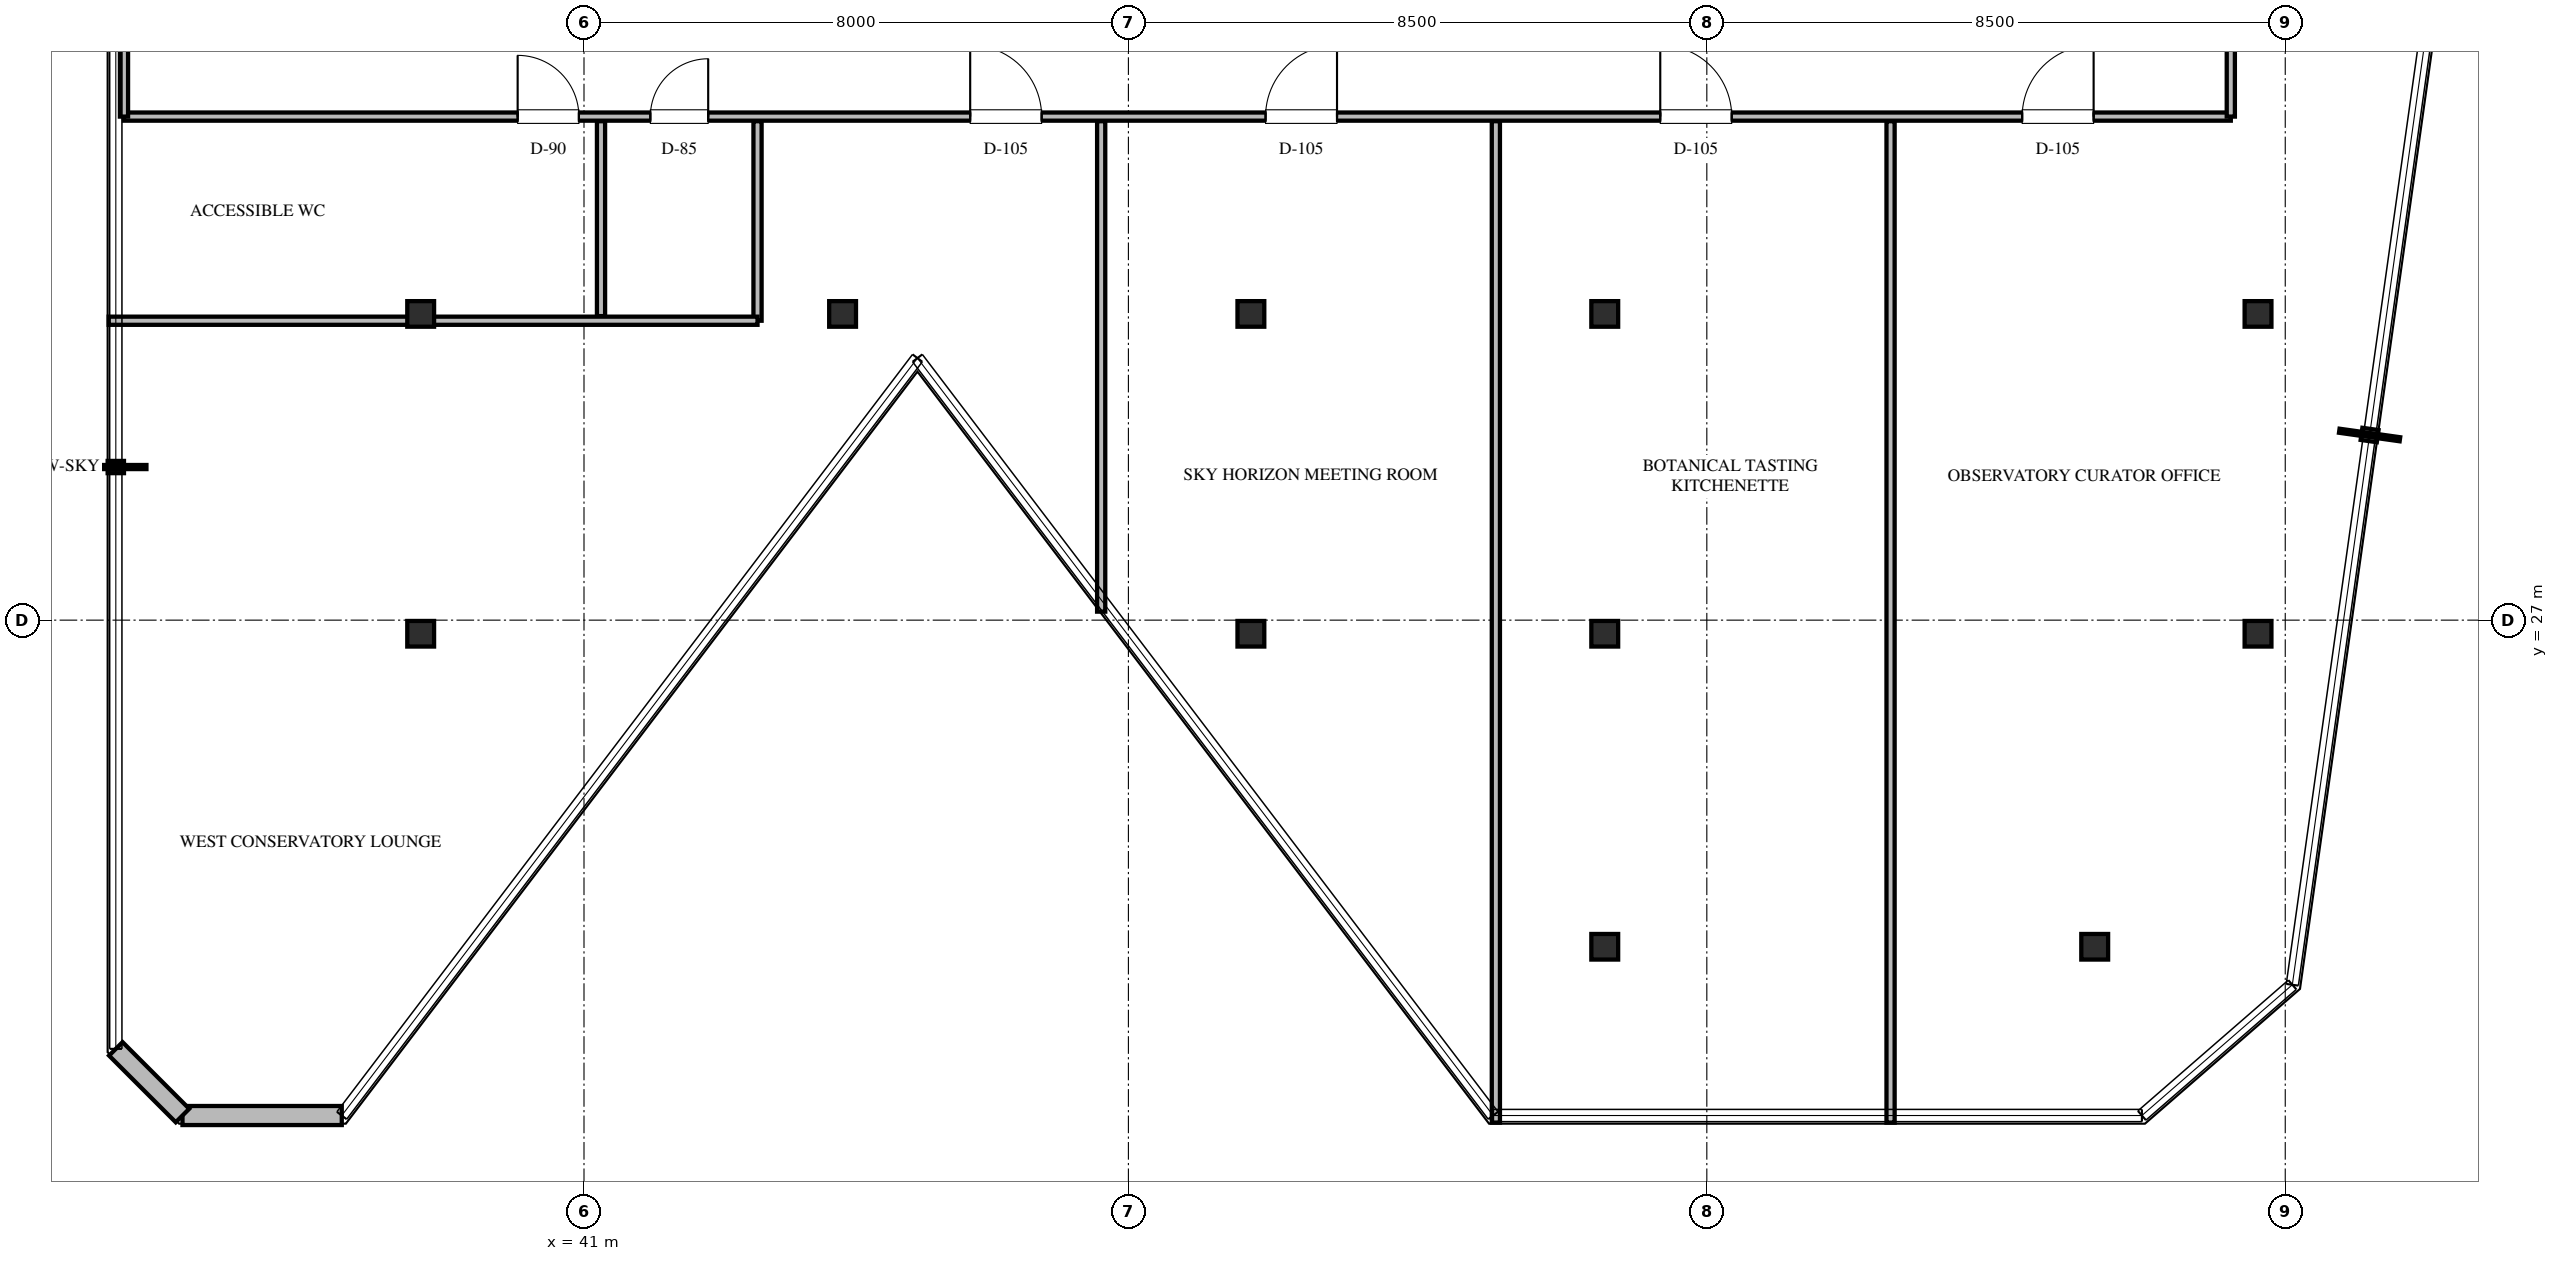
"""IFC4 building model, lengths in metres.
Left out: names, types, materials, properties, quantities, classifications, styles, units other than length and angle.
Written with IfcOpenShell. Run it as: python <this file> out.ifc"""

import sys

from ifc_helpers import new_model, si_unit, direction, frame, frame_2d, origin, origin_2d, place, context, subcontext, project, spatial, rectangle, i_section, extrude, element, fill, save


model = new_model("IFC4")
c1 = context("Model", 3, precision=1e-05, world=origin(), true_north=direction((0.0, 1.0)))
c2 = subcontext(c1, "Body", "Model", "MODEL_VIEW")
j1 = project(units=[si_unit("LENGTHUNIT", "METRE"), si_unit("PLANEANGLEUNIT", "RADIAN")], contexts=[c1])
p1 = place(None, origin())
s1 = spatial("IfcSite", under=j1, at=p1, CompositionType="ELEMENT")
p2 = place(p1, origin())
s2 = spatial("IfcBuilding", under=s1, at=p2, CompositionType="ELEMENT")
p3 = place(p2, frame((0.0, 0.0, 311.1)))
s3 = spatial("IfcBuildingStorey", under=s2, at=p3, CompositionType="ELEMENT", Elevation=311.1)
for number, where, z_axis, x_axis in (
    (1, (44.8, 31.5, 0.0), (0.0, 0.0, 1.0), (1.0, 0.0, 0.0)),
    (2, (50.8, 31.5, 0.0), (0.0, 0.0, 1.0), (1.0, 0.0, 0.0)),
    (3, (56.0, 31.5, 0.0), (0.0, 0.0, 1.0), (1.0, 0.0, 0.0)),
    (4, (65.6, 31.5, 0.0), (0.0, 0.0, 1.0), (1.0, 0.0, 0.0)),
    (5, (38.6, 31.5, 0.0), (0.0, 0.0, 1.0), (1.0, 0.0, 0.0)),
    (6, (38.6, 26.8, 0.0), (0.0, 0.0, 1.0), (1.0, 0.0, 0.0)),
    (7, (50.8, 26.8, 0.0), (0.0, 0.0, 1.0), (1.0, 0.0, 0.0)),
    (8, (56.0, 26.8, 0.0), (0.0, 0.0, 1.0), (1.0, 0.0, 0.0)),
    (9, (65.6, 26.8, 0.0), (0.0, 0.0, 1.0), (1.0, 0.0, 0.0)),
    (10, (56.0, 22.2, 0.0), (0.0, 0.0, 1.0), (1.0, 0.0, 0.0)),
    (11, (63.2, 22.2, 0.0), (0.0, 0.0, 1.0), (1.0, 0.0, 0.0)),
):
    element("IfcColumn", number, at=place(p3, frame(where, z_axis=z_axis, x_axis=x_axis)), inside=s3, PredefinedType="COLUMN", context=c2, shape_type="SweptSolid", body=[
        extrude(i_section(OverallWidth=0.394, OverallDepth=0.376, WebThickness=0.017, FlangeThickness=0.028, FilletRadius=0.03, at=origin_2d()), origin(), (0.0, 0.0, 1.0), 4.5),
    ])
p4 = place(p3, frame((37.44, 19.72, 0.0), z_axis=(0.0, 0.0, 1.0), x_axis=(-1.0, 0.0, 0.0)))
e12 = element("IfcWall", 12, at=p4, inside=s3, PredefinedType="STANDARD", context=c2, shape_type="SweptSolid", body=[
    extrude(rectangle(XDim=2.341, YDim=0.28, at=frame_2d((1.17, 0.0))), origin(), (0.0, 0.0, 1.0), 4.22),
])
p5 = place(p3, frame((35.1, 19.72, 0.0), z_axis=(0.0, 0.0, 1.0), x_axis=(-0.707018662703, 0.70719488869, 0.0)))
e13 = element("IfcWall", 13, at=p5, inside=s3, PredefinedType="STANDARD", context=c2, shape_type="SweptSolid", body=[
    extrude(rectangle(XDim=1.385, YDim=0.28, at=frame_2d((0.693, 0.0))), origin(), (0.0, 0.0, 1.0), 4.22),
])
p6 = place(p3, frame((34.24, 34.4, 0.0), z_axis=(0.0, 0.0, 1.0), x_axis=(1.0, 0.0, 0.0)))
e14 = element("IfcWall", 14, at=p6, inside=s3, PredefinedType="PARTITIONING", context=c2, shape_type="SweptSolid", body=[
    extrude(rectangle(XDim=30.96, YDim=0.12, at=frame_2d((15.48, 0.0))), origin(), (0.0, 0.0, 1.0), 3.609),
])
p7 = place(p6, frame((5.785, 0.0, 0.0)))
e15 = element("IfcOpeningElement", 15, at=p7, cuts=e14, PredefinedType="OPENING", context=c2, shape_type="SweptSolid", body=[
    extrude(rectangle(XDim=0.9, YDim=2.1, at=frame_2d((0.45, 1.05))), frame((0.0, 0.07, 0.0), z_axis=(0.0, -1.0, 0.0), x_axis=(1.0, 0.0, 0.0)), (0.0, 0.0, 1.0), 0.14),
])
p8 = place(p6, frame((7.735, 0.0, 0.0)))
e16 = element("IfcOpeningElement", 16, at=p8, cuts=e14, PredefinedType="OPENING", context=c2, shape_type="SweptSolid", body=[
    extrude(rectangle(XDim=0.85, YDim=2.1, at=frame_2d((0.425, 1.05))), frame((0.0, 0.07, 0.0), z_axis=(0.0, -1.0, 0.0), x_axis=(1.0, 0.0, 0.0)), (0.0, 0.0, 1.0), 0.14),
])
p9 = place(p6, frame((12.435, 0.0, 0.0)))
e17 = element("IfcOpeningElement", 17, at=p9, cuts=e14, PredefinedType="OPENING", context=c2, shape_type="SweptSolid", body=[
    extrude(rectangle(XDim=1.05, YDim=2.2, at=frame_2d((0.525, 1.1))), frame((0.0, 0.07, 0.0), z_axis=(0.0, -1.0, 0.0), x_axis=(1.0, 0.0, 0.0)), (0.0, 0.0, 1.0), 0.14),
])
p10 = place(p6, frame((16.776, 0.0, 0.0)))
e18 = element("IfcOpeningElement", 18, at=p10, cuts=e14, PredefinedType="OPENING", context=c2, shape_type="SweptSolid", body=[
    extrude(rectangle(XDim=1.05, YDim=2.2, at=frame_2d((0.525, 1.1))), frame((0.0, 0.07, 0.0), z_axis=(0.0, -1.0, 0.0), x_axis=(1.0, 0.0, 0.0)), (0.0, 0.0, 1.0), 0.14),
])
p11 = place(p6, frame((22.576, 0.0, 0.0)))
e19 = element("IfcOpeningElement", 19, at=p11, cuts=e14, PredefinedType="OPENING", context=c2, shape_type="SweptSolid", body=[
    extrude(rectangle(XDim=1.05, YDim=2.2, at=frame_2d((0.525, 1.1))), frame((0.0, 0.07, 0.0), z_axis=(0.0, -1.0, 0.0), x_axis=(1.0, 0.0, 0.0)), (0.0, 0.0, 1.0), 0.14),
])
p12 = place(p6, frame((27.894, 0.0, 0.0)))
e20 = element("IfcOpeningElement", 20, at=p12, cuts=e14, PredefinedType="OPENING", context=c2, shape_type="SweptSolid", body=[
    extrude(rectangle(XDim=1.05, YDim=2.2, at=frame_2d((0.525, 1.1))), frame((0.0, 0.07, 0.0), z_axis=(0.0, -1.0, 0.0), x_axis=(1.0, 0.0, 0.0)), (0.0, 0.0, 1.0), 0.14),
])
p13 = place(p3, frame((34.24, 34.4, 0.0), z_axis=(0.0, 0.0, 1.0), x_axis=(0.0, 1.0, 0.0)))
e21 = element("IfcWall", 21, at=p13, inside=s3, PredefinedType="PARTITIONING", context=c2, shape_type="SweptSolid", body=[
    extrude(rectangle(XDim=3.4, YDim=0.12, at=frame_2d((1.7, 0.0))), origin(), (0.0, 0.0, 1.0), 4.22),
])
p14 = place(p3, frame((65.2, 34.4, 0.0), z_axis=(0.0, 0.0, 1.0), x_axis=(0.0, 1.0, 0.0)))
e22 = element("IfcWall", 22, at=p14, inside=s3, PredefinedType="PARTITIONING", context=c2, shape_type="SweptSolid", body=[
    extrude(rectangle(XDim=3.367, YDim=0.12, at=frame_2d((1.684, 0.0))), origin(), (0.0, 0.0, 1.0), 3.609),
])
p15 = place(p3, frame((41.25, 31.468, 0.0), z_axis=(0.0, 0.0, 1.0), x_axis=(0.0, 1.0, 0.0)))
e23 = element("IfcWall", 23, at=p15, inside=s3, PredefinedType="PARTITIONING", context=c2, shape_type="SweptSolid", body=[
    extrude(rectangle(XDim=2.864, YDim=0.12, at=frame_2d((1.432, 0.0))), origin(), (0.0, 0.0, 1.0), 3.609),
])
p16 = place(p3, frame((43.55, 31.4, 0.0), z_axis=(0.0, 0.0, 1.0), x_axis=(0.0, 1.0, 0.0)))
e24 = element("IfcWall", 24, at=p16, inside=s3, PredefinedType="PARTITIONING", context=c2, shape_type="SweptSolid", body=[
    extrude(rectangle(XDim=2.932, YDim=0.12, at=frame_2d((1.466, 0.0))), origin(), (0.0, 0.0, 1.0), 3.609),
])
p17 = place(p3, frame((34.015, 31.4, 0.0), z_axis=(0.0, 0.0, 1.0), x_axis=(1.0, 0.0, 0.0)))
e25 = element("IfcWall", 25, at=p17, inside=s3, PredefinedType="PARTITIONING", context=c2, shape_type="SweptSolid", body=[
    extrude(rectangle(XDim=9.535, YDim=0.12, at=frame_2d((4.768, 0.0))), origin(), (0.0, 0.0, 1.0), 3.609),
])
p18 = place(p3, frame((48.6, 27.125, 0.0), z_axis=(0.0, 0.0, 1.0), x_axis=(0.0, 1.0, 0.0)))
e26 = element("IfcWall", 26, at=p18, inside=s3, PredefinedType="PARTITIONING", context=c2, shape_type="SweptSolid", body=[
    extrude(rectangle(XDim=7.207, YDim=0.12, at=frame_2d((3.604, 0.0))), origin(), (0.0, 0.0, 1.0), 3.609),
])
for number, where, z_axis, x_axis in (
    (27, (54.4, 19.615, 0.0), (0.0, 0.0, 1.0), (0.0, 1.0, 0.0)),
    (28, (60.2, 19.615, 0.0), (0.0, 0.0, 1.0), (0.0, 1.0, 0.0)),
):
    element("IfcWall", number, at=place(p3, frame(where, z_axis=z_axis, x_axis=x_axis)), inside=s3, PredefinedType="PARTITIONING", context=c2, shape_type="SweptSolid", body=[
        extrude(rectangle(XDim=14.717, YDim=0.12, at=frame_2d((7.358, 0.0))), origin(), (0.0, 0.0, 1.0), 3.609),
    ])
p19 = place(p7, origin())
e29 = element("IfcDoor", 29, at=p19, inside=s3, OperationType="SINGLE_SWING_LEFT", PredefinedType="DOOR", context=c2, shape_type="SweptSolid", body=[
    extrude(rectangle(XDim=0.9, YDim=2.1, at=frame_2d((0.45, 1.05))), frame((0.0, 0.025, 0.0), z_axis=(0.0, -1.0, 0.0), x_axis=(1.0, 0.0, 0.0)), (0.0, 0.0, 1.0), 0.05),
])
fill(e15, e29)
p20 = place(p8, origin())
e30 = element("IfcDoor", 30, at=p20, inside=s3, OperationType="SINGLE_SWING_RIGHT", PredefinedType="DOOR", context=c2, shape_type="SweptSolid", body=[
    extrude(rectangle(XDim=0.85, YDim=2.1, at=frame_2d((0.425, 1.05))), frame((0.0, 0.025, 0.0), z_axis=(0.0, -1.0, 0.0), x_axis=(1.0, 0.0, 0.0)), (0.0, 0.0, 1.0), 0.05),
])
fill(e16, e30)
p21 = place(p9, origin())
e31 = element("IfcDoor", 31, at=p21, inside=s3, OperationType="SINGLE_SWING_LEFT", PredefinedType="DOOR", context=c2, shape_type="SweptSolid", body=[
    extrude(rectangle(XDim=1.05, YDim=2.2, at=frame_2d((0.525, 1.1))), frame((0.0, 0.025, 0.0), z_axis=(0.0, -1.0, 0.0), x_axis=(1.0, 0.0, 0.0)), (0.0, 0.0, 1.0), 0.05),
])
fill(e17, e31)
p22 = place(p10, origin())
e32 = element("IfcDoor", 32, at=p22, inside=s3, OperationType="SINGLE_SWING_RIGHT", PredefinedType="DOOR", context=c2, shape_type="SweptSolid", body=[
    extrude(rectangle(XDim=1.05, YDim=2.2, at=frame_2d((0.525, 1.1))), frame((0.0, 0.025, 0.0), z_axis=(0.0, -1.0, 0.0), x_axis=(1.0, 0.0, 0.0)), (0.0, 0.0, 1.0), 0.05),
])
fill(e18, e32)
p23 = place(p11, origin())
e33 = element("IfcDoor", 33, at=p23, inside=s3, OperationType="SINGLE_SWING_LEFT", PredefinedType="DOOR", context=c2, shape_type="SweptSolid", body=[
    extrude(rectangle(XDim=1.05, YDim=2.2, at=frame_2d((0.525, 1.1))), frame((0.0, 0.025, 0.0), z_axis=(0.0, -1.0, 0.0), x_axis=(1.0, 0.0, 0.0)), (0.0, 0.0, 1.0), 0.05),
])
fill(e19, e33)
p24 = place(p12, origin())
e34 = element("IfcDoor", 34, at=p24, inside=s3, OperationType="SINGLE_SWING_RIGHT", PredefinedType="DOOR", context=c2, shape_type="SweptSolid", body=[
    extrude(rectangle(XDim=1.05, YDim=2.2, at=frame_2d((0.525, 1.1))), frame((0.0, 0.025, 0.0), z_axis=(0.0, -1.0, 0.0), x_axis=(1.0, 0.0, 0.0)), (0.0, 0.0, 1.0), 0.05),
])
fill(e20, e34)
save(model, sys.argv[1])
